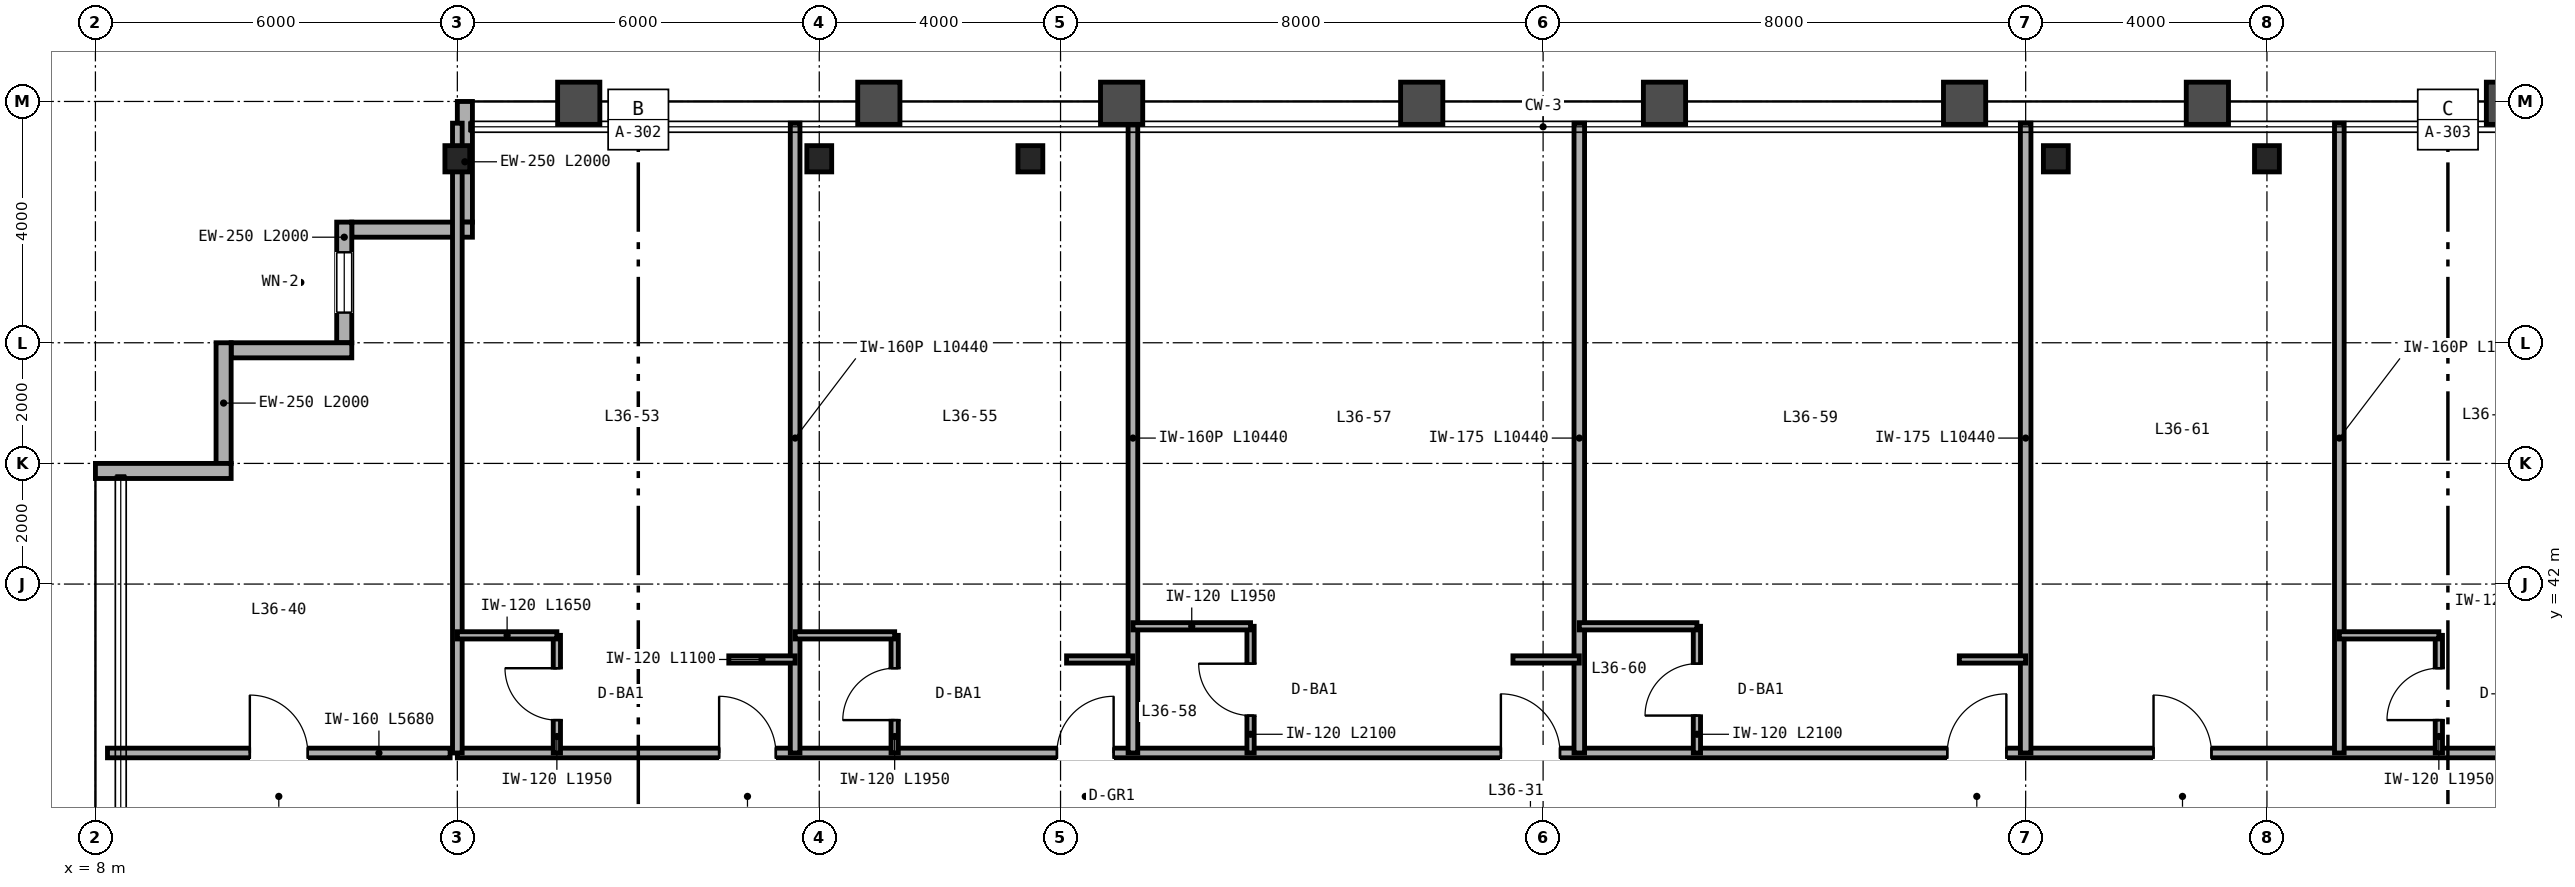
"""IFC4 building model, lengths in metres.
Left out: names, types, materials, properties, quantities, classifications, styles, units other than length and angle.
Written with IfcOpenShell. Run it as: python <this file> out.ifc"""

import sys

from ifc_helpers import new_model, si_unit, direction, frame, frame_2d, origin, origin_2d, place, context, subcontext, project, spatial, rectangle, i_section, extrude, source, transform, mapped, element, fill, save


model = new_model("IFC4")
c1 = context("Model", 3, precision=1e-05, world=origin(), true_north=direction((0.0, 1.0)))
c2 = subcontext(c1, "Body", "Model", "MODEL_VIEW")
j1 = project(units=[si_unit("LENGTHUNIT", "METRE"), si_unit("PLANEANGLEUNIT", "RADIAN")], contexts=[c1])
p1 = place(None, origin())
s1 = spatial("IfcSite", under=j1, at=p1, CompositionType="ELEMENT")
p2 = place(p1, origin())
s2 = spatial("IfcBuilding", under=s1, at=p2, CompositionType="ELEMENT")
p3 = place(p2, frame((0.0, 0.0, 144.0)))
s3 = spatial("IfcBuildingStorey", under=s2, at=p3, CompositionType="ELEMENT", Elevation=144.0)
m1 = source(origin(), c2, "Body", "SweptSolid", [
    extrude(i_section(OverallWidth=0.412, OverallDepth=0.435, WebThickness=0.036, FlangeThickness=0.057, FilletRadius=0.025, at=origin_2d()), origin(), (0.0, 0.0, 1.0), 3.36),
])
for number, where, z_axis, x_axis in (
    (1, (14.0, 49.05, 0.0), (0.0, 0.0, 1.0), (1.0, 0.0, 0.0)),
    (2, (20.0, 49.05, 0.0), (0.0, 0.0, 1.0), (1.0, 0.0, 0.0)),
    (3, (23.5, 49.05, 0.0), (0.0, 0.0, 1.0), (1.0, 0.0, 0.0)),
    (4, (40.5, 49.05, 0.0), (0.0, 0.0, 1.0), (1.0, 0.0, 0.0)),
    (5, (44.0, 49.05, 0.0), (0.0, 0.0, 1.0), (1.0, 0.0, 0.0)),
):
    element("IfcColumn", number, at=place(p3, frame(where, z_axis=z_axis, x_axis=x_axis)), inside=s3, PredefinedType="COLUMN", context=c2, shape_type="MappedRepresentation", body=[
        mapped(m1, transform((0.0, 0.0, 0.0), scale=1.0)),
    ])
p4 = place(p3, frame((14.125, 50.0, 0.0), z_axis=(0.0, 0.0, 1.0), x_axis=(0.0, -1.0, 0.0)))
e6 = element("IfcWall", 6, at=p4, inside=s3, PredefinedType="SOLIDWALL", context=c2, shape_type="SweptSolid", body=[
    extrude(rectangle(XDim=2.0, YDim=0.25, at=frame_2d((1.0, 0.0))), origin(), (0.0, 0.0, 1.0), 2.667),
])
p5 = place(p3, frame((14.25, 47.875, 0.0), z_axis=(0.0, 0.0, 1.0), x_axis=(-1.0, 0.0, 0.0)))
e7 = element("IfcWall", 7, at=p5, inside=s3, PredefinedType="SOLIDWALL", context=c2, shape_type="SweptSolid", body=[
    extrude(rectangle(XDim=2.0, YDim=0.25, at=frame_2d((1.0, 0.0))), origin(), (0.0, 0.0, 1.0), 3.36),
])
p6 = place(p3, frame((12.125, 48.0, 0.0), z_axis=(0.0, 0.0, 1.0), x_axis=(0.0, -1.0, 0.0)))
e8 = element("IfcWall", 8, at=p6, inside=s3, PredefinedType="SOLIDWALL", context=c2, shape_type="SweptSolid", body=[
    extrude(rectangle(XDim=2.0, YDim=0.25, at=frame_2d((1.0, 0.0))), origin(), (0.0, 0.0, 1.0), 3.36),
])
p7 = place(p6, frame((0.5, 0.0, 0.85)))
e9 = element("IfcOpeningElement", 9, at=p7, cuts=e8, PredefinedType="OPENING", context=c2, shape_type="SweptSolid", body=[
    extrude(rectangle(XDim=1.0, YDim=1.9, at=frame_2d((0.5, 0.95))), frame((0.0, 0.135, 0.0), z_axis=(0.0, -1.0, 0.0), x_axis=(1.0, 0.0, 0.0)), (0.0, 0.0, 1.0), 0.27),
])
for number, where, z_axis, x_axis in (
    (10, (12.25, 45.875, 0.0), (0.0, 0.0, 1.0), (-1.0, 0.0, 0.0)),
    (11, (10.125, 46.0, 0.0), (0.0, 0.0, 1.0), (0.0, -1.0, 0.0)),
):
    element("IfcWall", number, at=place(p3, frame(where, z_axis=z_axis, x_axis=x_axis)), inside=s3, PredefinedType="SOLIDWALL", context=c2, shape_type="SweptSolid", body=[
        extrude(rectangle(XDim=2.0, YDim=0.25, at=frame_2d((1.0, 0.0))), origin(), (0.0, 0.0, 1.0), 3.36),
    ])
p8 = place(p3, frame((10.25, 43.875, 0.0), z_axis=(0.0, 0.0, 1.0), x_axis=(-1.0, 0.0, 0.0)))
e12 = element("IfcWall", 12, at=p8, inside=s3, PredefinedType="SOLIDWALL", context=c2, shape_type="SweptSolid", body=[
    extrude(rectangle(XDim=2.25, YDim=0.25, at=frame_2d((1.125, 0.0))), origin(), (0.0, 0.0, 1.0), 3.36),
])
p9 = place(p3, frame((8.2, 39.2, 0.0), z_axis=(0.0, 0.0, 1.0), x_axis=(1.0, 0.0, 0.0)))
e13 = element("IfcWall", 13, at=p9, inside=s3, PredefinedType="PARTITIONING", context=c2, shape_type="SweptSolid", body=[
    extrude(rectangle(XDim=5.68, YDim=0.16, at=frame_2d((2.84, 0.0))), origin(), (0.0, 0.0, 1.0), 3.36),
])
p10 = place(p9, frame((2.36, 0.0, 0.0)))
e14 = element("IfcOpeningElement", 14, at=p10, cuts=e13, PredefinedType="OPENING", context=c2, shape_type="SweptSolid", body=[
    extrude(rectangle(XDim=0.96, YDim=2.15, at=frame_2d((0.48, 1.075))), frame((0.0, 0.09, 0.0), z_axis=(0.0, -1.0, 0.0), x_axis=(1.0, 0.0, 0.0)), (0.0, 0.0, 1.0), 0.18),
])
p11 = place(p3, frame((14.0, 39.2, 0.0), z_axis=(0.0, 0.0, 1.0), x_axis=(1.0, 0.0, 0.0)))
e15 = element("IfcWall", 15, at=p11, inside=s3, PredefinedType="PARTITIONING", context=c2, shape_type="SweptSolid", body=[
    extrude(rectangle(XDim=36.0, YDim=0.16, at=frame_2d((18.0, 0.0))), origin(), (0.0, 0.0, 1.0), 2.581),
])
p12 = place(p11, frame((4.34, 0.0, 0.0)))
e16 = element("IfcOpeningElement", 16, at=p12, cuts=e15, PredefinedType="OPENING", context=c2, shape_type="SweptSolid", body=[
    extrude(rectangle(XDim=0.94, YDim=2.15, at=frame_2d((0.47, 1.075))), frame((0.0, 0.09, 0.0), z_axis=(0.0, -1.0, 0.0), x_axis=(1.0, 0.0, 0.0)), (0.0, 0.0, 1.0), 0.18),
])
p13 = place(p11, frame((9.94, 0.0, 0.0)))
e17 = element("IfcOpeningElement", 17, at=p13, cuts=e15, PredefinedType="OPENING", context=c2, shape_type="SweptSolid", body=[
    extrude(rectangle(XDim=0.94, YDim=2.15, at=frame_2d((0.47, 1.075))), frame((0.0, 0.09, 0.0), z_axis=(0.0, -1.0, 0.0), x_axis=(1.0, 0.0, 0.0)), (0.0, 0.0, 1.0), 0.18),
])
p14 = place(p11, frame((17.3, 0.0, 0.0)))
e18 = element("IfcOpeningElement", 18, at=p14, cuts=e15, PredefinedType="OPENING", context=c2, shape_type="SweptSolid", body=[
    extrude(rectangle(XDim=0.98, YDim=2.2, at=frame_2d((0.49, 1.1))), frame((0.0, 0.09, 0.0), z_axis=(0.0, -1.0, 0.0), x_axis=(1.0, 0.0, 0.0)), (0.0, 0.0, 1.0), 0.18),
])
p15 = place(p11, frame((24.7, 0.0, 0.0)))
e19 = element("IfcOpeningElement", 19, at=p15, cuts=e15, PredefinedType="OPENING", context=c2, shape_type="SweptSolid", body=[
    extrude(rectangle(XDim=0.98, YDim=2.2, at=frame_2d((0.49, 1.1))), frame((0.0, 0.09, 0.0), z_axis=(0.0, -1.0, 0.0), x_axis=(1.0, 0.0, 0.0)), (0.0, 0.0, 1.0), 0.18),
])
p16 = place(p11, frame((28.12, 0.0, 0.0)))
e20 = element("IfcOpeningElement", 20, at=p16, cuts=e15, PredefinedType="OPENING", context=c2, shape_type="SweptSolid", body=[
    extrude(rectangle(XDim=0.96, YDim=2.15, at=frame_2d((0.48, 1.075))), frame((0.0, 0.09, 0.0), z_axis=(0.0, -1.0, 0.0), x_axis=(1.0, 0.0, 0.0)), (0.0, 0.0, 1.0), 0.18),
])
p17 = place(p11, frame((34.74, 0.0, 0.0)))
e21 = element("IfcOpeningElement", 21, at=p17, cuts=e15, PredefinedType="OPENING", context=c2, shape_type="SweptSolid", body=[
    extrude(rectangle(XDim=0.94, YDim=2.15, at=frame_2d((0.47, 1.075))), frame((0.0, 0.09, 0.0), z_axis=(0.0, -1.0, 0.0), x_axis=(1.0, 0.0, 0.0)), (0.0, 0.0, 1.0), 0.18),
])
for number, where, z_axis, x_axis in (
    (22, (14.0, 39.2, 0.0), (0.0, 0.0, 1.0), (0.0, 1.0, 0.0)),
    (23, (19.6, 39.2, 0.0), (0.0, 0.0, 1.0), (0.0, 1.0, 0.0)),
):
    element("IfcWall", number, at=place(p3, frame(where, z_axis=z_axis, x_axis=x_axis)), inside=s3, PredefinedType="PARTITIONING", context=c2, shape_type="SweptSolid", body=[
        extrude(rectangle(XDim=10.44, YDim=0.16, at=frame_2d((5.22, 0.0))), origin(), (0.0, 0.0, 1.0), 2.667),
    ])
p18 = place(p3, frame((15.65, 39.2, 0.0), z_axis=(0.0, 0.0, 1.0), x_axis=(0.0, 1.0, 0.0)))
e24 = element("IfcWall", 24, at=p18, inside=s3, PredefinedType="PARTITIONING", context=c2, shape_type="SweptSolid", body=[
    extrude(rectangle(XDim=1.95, YDim=0.12, at=frame_2d((0.975, 0.0))), origin(), (0.0, 0.0, 1.0), 3.36),
])
p19 = place(p18, frame((0.545, 0.0, 0.0)))
e25 = element("IfcOpeningElement", 25, at=p19, cuts=e24, PredefinedType="OPENING", context=c2, shape_type="SweptSolid", body=[
    extrude(rectangle(XDim=0.86, YDim=2.1, at=frame_2d((0.43, 1.05))), frame((0.0, 0.07, 0.0), z_axis=(0.0, -1.0, 0.0), x_axis=(1.0, 0.0, 0.0)), (0.0, 0.0, 1.0), 0.14),
])
p20 = place(p3, frame((14.0, 41.15, 0.0), z_axis=(0.0, 0.0, 1.0), x_axis=(1.0, 0.0, 0.0)))
e26 = element("IfcWall", 26, at=p20, inside=s3, PredefinedType="PARTITIONING", context=c2, shape_type="SweptSolid", body=[
    extrude(rectangle(XDim=1.65, YDim=0.12, at=frame_2d((0.825, 0.0))), origin(), (0.0, 0.0, 1.0), 3.36),
])
p21 = place(p3, frame((18.5, 40.75, 0.0), z_axis=(0.0, 0.0, 1.0), x_axis=(1.0, 0.0, 0.0)))
e27 = element("IfcWall", 27, at=p21, inside=s3, PredefinedType="PARTITIONING", context=c2, shape_type="SweptSolid", body=[
    extrude(rectangle(XDim=1.1, YDim=0.12, at=frame_2d((0.55, 0.0))), origin(), (0.0, 0.0, 1.0), 3.36),
])
p22 = place(p3, frame((25.2, 39.2, 0.0), z_axis=(0.0, 0.0, 1.0), x_axis=(0.0, 1.0, 0.0)))
e28 = element("IfcWall", 28, at=p22, inside=s3, PredefinedType="PARTITIONING", context=c2, shape_type="SweptSolid", body=[
    extrude(rectangle(XDim=10.44, YDim=0.16, at=frame_2d((5.22, 0.0))), origin(), (0.0, 0.0, 1.0), 2.433),
])
p23 = place(p3, frame((21.25, 39.2, 0.0), z_axis=(0.0, 0.0, 1.0), x_axis=(0.0, 1.0, 0.0)))
e29 = element("IfcWall", 29, at=p23, inside=s3, PredefinedType="PARTITIONING", context=c2, shape_type="SweptSolid", body=[
    extrude(rectangle(XDim=1.95, YDim=0.12, at=frame_2d((0.975, 0.0))), origin(), (0.0, 0.0, 1.0), 3.36),
])
p24 = place(p23, frame((0.545, 0.0, 0.0)))
e30 = element("IfcOpeningElement", 30, at=p24, cuts=e29, PredefinedType="OPENING", context=c2, shape_type="SweptSolid", body=[
    extrude(rectangle(XDim=0.86, YDim=2.1, at=frame_2d((0.43, 1.05))), frame((0.0, 0.07, 0.0), z_axis=(0.0, -1.0, 0.0), x_axis=(1.0, 0.0, 0.0)), (0.0, 0.0, 1.0), 0.14),
])
p25 = place(p3, frame((19.6, 41.15, 0.0), z_axis=(0.0, 0.0, 1.0), x_axis=(1.0, 0.0, 0.0)))
e31 = element("IfcWall", 31, at=p25, inside=s3, PredefinedType="PARTITIONING", context=c2, shape_type="SweptSolid", body=[
    extrude(rectangle(XDim=1.65, YDim=0.12, at=frame_2d((0.825, 0.0))), origin(), (0.0, 0.0, 1.0), 3.36),
])
p26 = place(p3, frame((24.1, 40.75, 0.0), z_axis=(0.0, 0.0, 1.0), x_axis=(1.0, 0.0, 0.0)))
e32 = element("IfcWall", 32, at=p26, inside=s3, PredefinedType="PARTITIONING", context=c2, shape_type="SweptSolid", body=[
    extrude(rectangle(XDim=1.1, YDim=0.12, at=frame_2d((0.55, 0.0))), origin(), (0.0, 0.0, 1.0), 3.36),
])
p27 = place(p3, frame((32.6, 39.2, 0.0), z_axis=(0.0, 0.0, 1.0), x_axis=(0.0, 1.0, 0.0)))
e33 = element("IfcWall", 33, at=p27, inside=s3, PredefinedType="PARTITIONING", context=c2, shape_type="SweptSolid", body=[
    extrude(rectangle(XDim=10.44, YDim=0.175, at=frame_2d((5.22, 0.0))), origin(), (0.0, 0.0, 1.0), 2.433),
])
p28 = place(p3, frame((27.15, 39.2, 0.0), z_axis=(0.0, 0.0, 1.0), x_axis=(0.0, 1.0, 0.0)))
e34 = element("IfcWall", 34, at=p28, inside=s3, PredefinedType="PARTITIONING", context=c2, shape_type="SweptSolid", body=[
    extrude(rectangle(XDim=2.1, YDim=0.12, at=frame_2d((1.05, 0.0))), origin(), (0.0, 0.0, 1.0), 3.36),
])
p29 = place(p28, frame((0.62, 0.0, 0.0)))
e35 = element("IfcOpeningElement", 35, at=p29, cuts=e34, PredefinedType="OPENING", context=c2, shape_type="SweptSolid", body=[
    extrude(rectangle(XDim=0.86, YDim=2.1, at=frame_2d((0.43, 1.05))), frame((0.0, 0.07, 0.0), z_axis=(0.0, -1.0, 0.0), x_axis=(1.0, 0.0, 0.0)), (0.0, 0.0, 1.0), 0.14),
])
p30 = place(p3, frame((25.2, 41.3, 0.0), z_axis=(0.0, 0.0, 1.0), x_axis=(1.0, 0.0, 0.0)))
e36 = element("IfcWall", 36, at=p30, inside=s3, PredefinedType="PARTITIONING", context=c2, shape_type="SweptSolid", body=[
    extrude(rectangle(XDim=1.95, YDim=0.12, at=frame_2d((0.975, 0.0))), origin(), (0.0, 0.0, 1.0), 3.36),
])
p31 = place(p3, frame((31.5, 40.75, 0.0), z_axis=(0.0, 0.0, 1.0), x_axis=(1.0, 0.0, 0.0)))
e37 = element("IfcWall", 37, at=p31, inside=s3, PredefinedType="PARTITIONING", context=c2, shape_type="SweptSolid", body=[
    extrude(rectangle(XDim=1.1, YDim=0.12, at=frame_2d((0.55, 0.0))), origin(), (0.0, 0.0, 1.0), 3.36),
])
p32 = place(p3, frame((40.0, 39.2, 0.0), z_axis=(0.0, 0.0, 1.0), x_axis=(0.0, 1.0, 0.0)))
e38 = element("IfcWall", 38, at=p32, inside=s3, PredefinedType="PARTITIONING", context=c2, shape_type="SweptSolid", body=[
    extrude(rectangle(XDim=10.44, YDim=0.175, at=frame_2d((5.22, 0.0))), origin(), (0.0, 0.0, 1.0), 2.433),
])
p33 = place(p3, frame((34.55, 39.2, 0.0), z_axis=(0.0, 0.0, 1.0), x_axis=(0.0, 1.0, 0.0)))
e39 = element("IfcWall", 39, at=p33, inside=s3, PredefinedType="PARTITIONING", context=c2, shape_type="SweptSolid", body=[
    extrude(rectangle(XDim=2.1, YDim=0.12, at=frame_2d((1.05, 0.0))), origin(), (0.0, 0.0, 1.0), 3.36),
])
p34 = place(p33, frame((0.62, 0.0, 0.0)))
e40 = element("IfcOpeningElement", 40, at=p34, cuts=e39, PredefinedType="OPENING", context=c2, shape_type="SweptSolid", body=[
    extrude(rectangle(XDim=0.86, YDim=2.1, at=frame_2d((0.43, 1.05))), frame((0.0, 0.07, 0.0), z_axis=(0.0, -1.0, 0.0), x_axis=(1.0, 0.0, 0.0)), (0.0, 0.0, 1.0), 0.14),
])
p35 = place(p3, frame((32.6, 41.3, 0.0), z_axis=(0.0, 0.0, 1.0), x_axis=(1.0, 0.0, 0.0)))
e41 = element("IfcWall", 41, at=p35, inside=s3, PredefinedType="PARTITIONING", context=c2, shape_type="SweptSolid", body=[
    extrude(rectangle(XDim=1.95, YDim=0.12, at=frame_2d((0.975, 0.0))), origin(), (0.0, 0.0, 1.0), 3.36),
])
p36 = place(p3, frame((38.9, 40.75, 0.0), z_axis=(0.0, 0.0, 1.0), x_axis=(1.0, 0.0, 0.0)))
e42 = element("IfcWall", 42, at=p36, inside=s3, PredefinedType="PARTITIONING", context=c2, shape_type="SweptSolid", body=[
    extrude(rectangle(XDim=1.1, YDim=0.12, at=frame_2d((0.55, 0.0))), origin(), (0.0, 0.0, 1.0), 3.36),
])
p37 = place(p3, frame((45.2, 39.2, 0.0), z_axis=(0.0, 0.0, 1.0), x_axis=(0.0, 1.0, 0.0)))
e43 = element("IfcWall", 43, at=p37, inside=s3, PredefinedType="PARTITIONING", context=c2, shape_type="SweptSolid", body=[
    extrude(rectangle(XDim=10.44, YDim=0.16, at=frame_2d((5.22, 0.0))), origin(), (0.0, 0.0, 1.0), 2.667),
])
p38 = place(p3, frame((46.85, 39.2, 0.0), z_axis=(0.0, 0.0, 1.0), x_axis=(0.0, 1.0, 0.0)))
e44 = element("IfcWall", 44, at=p38, inside=s3, PredefinedType="PARTITIONING", context=c2, shape_type="SweptSolid", body=[
    extrude(rectangle(XDim=1.95, YDim=0.12, at=frame_2d((0.975, 0.0))), origin(), (0.0, 0.0, 1.0), 3.36),
])
p39 = place(p38, frame((0.545, 0.0, 0.0)))
e45 = element("IfcOpeningElement", 45, at=p39, cuts=e44, PredefinedType="OPENING", context=c2, shape_type="SweptSolid", body=[
    extrude(rectangle(XDim=0.86, YDim=2.1, at=frame_2d((0.43, 1.05))), frame((0.0, 0.07, 0.0), z_axis=(0.0, -1.0, 0.0), x_axis=(1.0, 0.0, 0.0)), (0.0, 0.0, 1.0), 0.14),
])
p40 = place(p3, frame((45.2, 41.15, 0.0), z_axis=(0.0, 0.0, 1.0), x_axis=(1.0, 0.0, 0.0)))
e46 = element("IfcWall", 46, at=p40, inside=s3, PredefinedType="PARTITIONING", context=c2, shape_type="SweptSolid", body=[
    extrude(rectangle(XDim=1.65, YDim=0.12, at=frame_2d((0.825, 0.0))), origin(), (0.0, 0.0, 1.0), 3.36),
])
m2 = source(origin(), c2, "Body", "SweptSolid", [
    extrude(rectangle(XDim=1.0, YDim=1.9, at=frame_2d((0.5, 0.95))), frame((0.0, 0.03, 0.0), z_axis=(0.0, -1.0, 0.0), x_axis=(1.0, 0.0, 0.0)), (0.0, 0.0, 1.0), 0.06),
])
p41 = place(p7, origin())
e47 = element("IfcWindow", 47, at=p41, inside=s3, PartitioningType="SINGLE_PANEL", PredefinedType="WINDOW", context=c2, shape_type="MappedRepresentation", body=[
    mapped(m2, transform((0.0, 0.0, 0.0), scale=1.0)),
])
fill(e9, e47)
m3 = source(origin(), c2, "Body", "SweptSolid", [
    extrude(rectangle(XDim=0.96, YDim=2.15, at=frame_2d((0.48, 1.075))), frame((0.0, 0.025, 0.0), z_axis=(0.0, -1.0, 0.0), x_axis=(1.0, 0.0, 0.0)), (0.0, 0.0, 1.0), 0.05),
])
p42 = place(p10, origin())
e48 = element("IfcDoor", 48, at=p42, inside=s3, OperationType="SINGLE_SWING_LEFT", PredefinedType="DOOR", context=c2, shape_type="MappedRepresentation", body=[
    mapped(m3, transform((0.0, 0.0, 0.0), scale=1.0)),
])
fill(e14, e48)
m4 = source(origin(), c2, "Body", "SweptSolid", [
    extrude(rectangle(XDim=0.86, YDim=2.1, at=frame_2d((0.43, 1.05))), frame((0.0, 0.025, 0.0), z_axis=(0.0, -1.0, 0.0), x_axis=(1.0, 0.0, 0.0)), (0.0, 0.0, 1.0), 0.05),
])
p43 = place(p19, origin())
e49 = element("IfcDoor", 49, at=p43, inside=s3, OperationType="SINGLE_SWING_RIGHT", PredefinedType="DOOR", context=c2, shape_type="MappedRepresentation", body=[
    mapped(m4, transform((0.0, 0.0, 0.0), scale=1.0)),
])
fill(e25, e49)
p44 = place(p24, origin())
e50 = element("IfcDoor", 50, at=p44, inside=s3, OperationType="SINGLE_SWING_LEFT", PredefinedType="DOOR", context=c2, shape_type="MappedRepresentation", body=[
    mapped(m4, transform((0.0, 0.0, 0.0), scale=1.0)),
])
fill(e30, e50)
p45 = place(p29, origin())
e51 = element("IfcDoor", 51, at=p45, inside=s3, OperationType="SINGLE_SWING_RIGHT", PredefinedType="DOOR", context=c2, shape_type="MappedRepresentation", body=[
    mapped(m4, transform((0.0, 0.0, 0.0), scale=1.0)),
])
fill(e35, e51)
p46 = place(p34, origin())
e52 = element("IfcDoor", 52, at=p46, inside=s3, OperationType="SINGLE_SWING_LEFT", PredefinedType="DOOR", context=c2, shape_type="MappedRepresentation", body=[
    mapped(m4, transform((0.0, 0.0, 0.0), scale=1.0)),
])
fill(e40, e52)
p47 = place(p39, origin())
e53 = element("IfcDoor", 53, at=p47, inside=s3, OperationType="SINGLE_SWING_LEFT", PredefinedType="DOOR", context=c2, shape_type="MappedRepresentation", body=[
    mapped(m4, transform((0.0, 0.0, 0.0), scale=1.0)),
])
fill(e45, e53)
m5 = source(origin(), c2, "Body", "SweptSolid", [
    extrude(rectangle(XDim=0.94, YDim=2.15, at=frame_2d((0.47, 1.075))), frame((0.0, 0.025, 0.0), z_axis=(0.0, -1.0, 0.0), x_axis=(1.0, 0.0, 0.0)), (0.0, 0.0, 1.0), 0.05),
])
p48 = place(p12, origin())
e54 = element("IfcDoor", 54, at=p48, inside=s3, OperationType="SINGLE_SWING_LEFT", PredefinedType="DOOR", context=c2, shape_type="MappedRepresentation", body=[
    mapped(m5, transform((0.0, 0.0, 0.0), scale=1.0)),
])
fill(e16, e54)
p49 = place(p13, origin())
e55 = element("IfcDoor", 55, at=p49, inside=s3, OperationType="SINGLE_SWING_RIGHT", PredefinedType="DOOR", context=c2, shape_type="MappedRepresentation", body=[
    mapped(m5, transform((0.0, 0.0, 0.0), scale=1.0)),
])
fill(e17, e55)
m6 = source(origin(), c2, "Body", "SweptSolid", [
    extrude(rectangle(XDim=0.98, YDim=2.2, at=frame_2d((0.49, 1.1))), frame((0.0, 0.025, 0.0), z_axis=(0.0, -1.0, 0.0), x_axis=(1.0, 0.0, 0.0)), (0.0, 0.0, 1.0), 0.05),
])
p50 = place(p14, origin())
e56 = element("IfcDoor", 56, at=p50, inside=s3, OperationType="SINGLE_SWING_LEFT", PredefinedType="DOOR", context=c2, shape_type="MappedRepresentation", body=[
    mapped(m6, transform((0.0, 0.0, 0.0), scale=1.0)),
])
fill(e18, e56)
p51 = place(p15, origin())
e57 = element("IfcDoor", 57, at=p51, inside=s3, OperationType="SINGLE_SWING_RIGHT", PredefinedType="DOOR", context=c2, shape_type="MappedRepresentation", body=[
    mapped(m6, transform((0.0, 0.0, 0.0), scale=1.0)),
])
fill(e19, e57)
p52 = place(p16, origin())
e58 = element("IfcDoor", 58, at=p52, inside=s3, OperationType="SINGLE_SWING_LEFT", PredefinedType="DOOR", context=c2, shape_type="MappedRepresentation", body=[
    mapped(m3, transform((0.0, 0.0, 0.0), scale=1.0)),
])
fill(e20, e58)
save(model, sys.argv[1])
